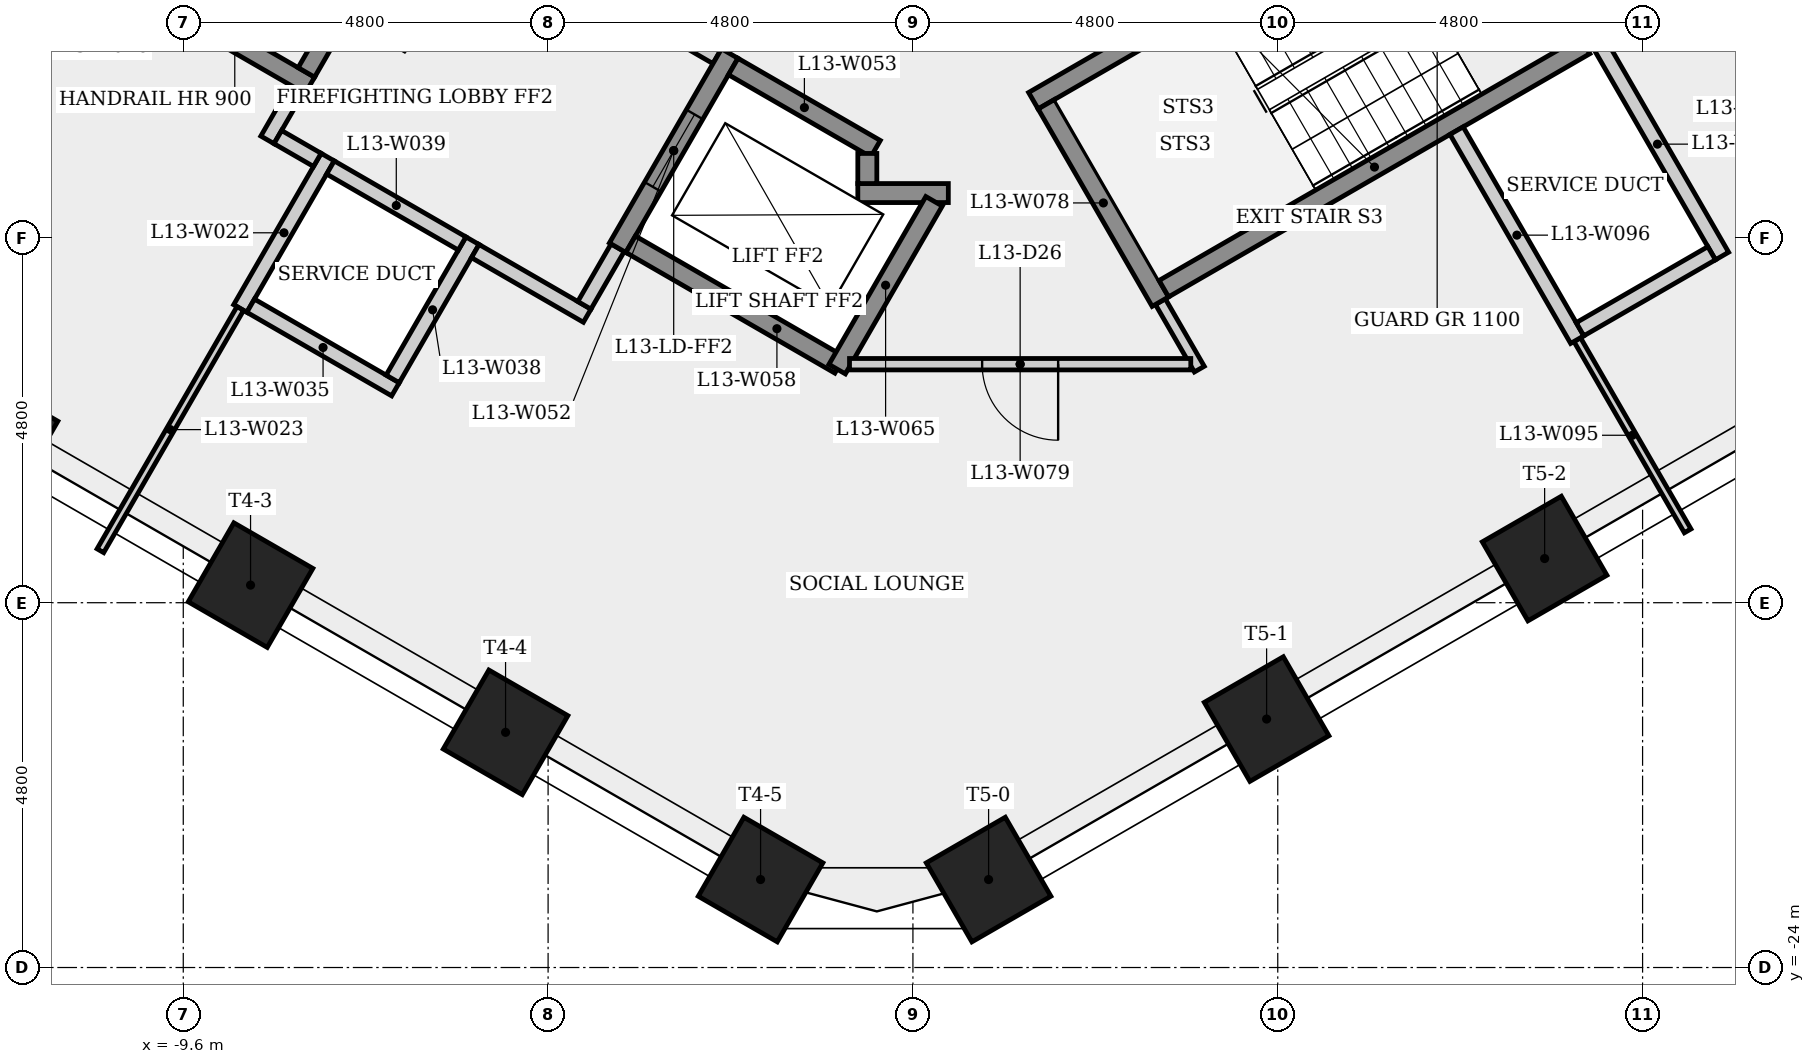
"""IFC4 building model, lengths in metres.
Left out: names, types, materials, properties, quantities, classifications, styles, units other than length and angle.
Written with IfcOpenShell. Run it as: python <this file> out.ifc"""

import sys

from ifc_helpers import new_model, si_unit, direction, frame, frame_2d, origin, origin_2d, place, context, subcontext, project, spatial, rectangle, extrude, element, fill, save


model = new_model("IFC4")
c1 = context("Model", 3, precision=1e-05, world=origin(), true_north=direction((0.0, 1.0)))
c2 = subcontext(c1, "Body", "Model", "MODEL_VIEW")
j1 = project(units=[si_unit("LENGTHUNIT", "METRE"), si_unit("PLANEANGLEUNIT", "RADIAN")], contexts=[c1])
p1 = place(None, origin())
s1 = spatial("IfcSite", under=j1, at=p1, CompositionType="ELEMENT")
p2 = place(p1, origin())
s2 = spatial("IfcBuilding", under=s1, at=p2, CompositionType="ELEMENT")
p3 = place(p2, frame((0.0, 0.0, 52.7)))
s3 = spatial("IfcBuildingStorey", under=s2, at=p3, CompositionType="ELEMENT", Elevation=52.7)
for number, where, z_axis, x_axis in (
    (1, (-12.07, -17.031, 0.0), (0.0, 0.0, 1.0), (-0.5, -0.866, 0.0)),
    (2, (-8.715, -18.969, 0.0), (0.0, 0.0, 1.0), (-0.5, -0.866, 0.0)),
    (3, (-5.36, -20.906, 0.0), (0.0, 0.0, 1.0), (-0.5, -0.866, 0.0)),
    (4, (-2.004, -22.843, 0.0), (0.0, 0.0, 1.0), (-0.5, -0.866, 0.0)),
    (5, (0.996, -22.843, 0.0), (0.0, 0.0, 1.0), (0.5, -0.866, 0.0)),
    (6, (4.653, -20.731, 0.0), (0.0, 0.0, 1.0), (0.5, -0.866, 0.0)),
    (7, (8.311, -18.619, 0.0), (0.0, 0.0, 1.0), (0.5, -0.866, 0.0)),
):
    element("IfcColumn", number, at=place(p3, frame(where, z_axis=z_axis, x_axis=x_axis)), inside=s3, PredefinedType="COLUMN", context=c2, shape_type="SweptSolid", body=[
        extrude(rectangle(XDim=1.2, YDim=1.2, at=origin_2d()), origin(), (0.0, 0.0, 1.0), 3.4),
    ])
p4 = place(p3, frame((-8.85, -15.329, 0.0), z_axis=(0.0, 0.0, 1.0), x_axis=(0.500077740698, 0.865980515519, 0.0)))
e8 = element("IfcWall", 8, at=p4, inside=s3, PredefinedType="PLUMBINGWALL", context=c2, shape_type="SweptSolid", body=[
    extrude(rectangle(XDim=2.3, YDim=0.2, at=frame_2d((1.15, 0.0))), origin(), (0.0, 0.0, 1.0), 3.05),
])
p5 = place(p3, frame((-8.85, -15.329, 0.0), z_axis=(0.0, 0.0, 1.0), x_axis=(-0.499955964762, -0.866050826049, 0.0)))
e9 = element("IfcWall", 9, at=p5, inside=s3, PredefinedType="PARTITIONING", context=c2, shape_type="SweptSolid", body=[
    extrude(rectangle(XDim=3.68, YDim=0.1, at=frame_2d((1.84, 0.0))), origin(), (0.0, 0.0, 1.0), 3.05),
])
p6 = place(p3, frame((-8.493, -13.11, 0.0), z_axis=(0.0, 0.0, 1.0), x_axis=(0.500067724834, 0.865986299303, 0.0)))
e10 = element("IfcWall", 10, at=p6, inside=s3, PredefinedType="PARTITIONING", context=c2, shape_type="SweptSolid", body=[
    extrude(rectangle(XDim=0.775, YDim=0.2, at=frame_2d((0.388, 0.0))), origin(), (0.0, 0.0, 1.0), 3.05),
])
p7 = place(p3, frame((-7.935, -12.393, 0.0), z_axis=(0.0, 0.0, 1.0), x_axis=(-0.866025499775, 0.499999833739, 0.0)))
e11 = element("IfcWall", 11, at=p7, inside=s3, PredefinedType="SHEAR", context=c2, shape_type="SweptSolid", body=[
    extrude(rectangle(XDim=6.4, YDim=0.25, at=frame_2d((3.2, 0.0))), origin(), (0.0, 0.0, 1.0), 3.05),
])
p8 = place(p3, frame((-7.836, -13.373, 0.0), z_axis=(0.0, 0.0, 1.0), x_axis=(-0.866232998003, 0.499640263761, 0.0)))
e12 = element("IfcWall", 12, at=p8, inside=s3, PredefinedType="PARTITIONING", context=c2, shape_type="SweptSolid", body=[
    extrude(rectangle(XDim=0.6, YDim=0.2, at=frame_2d((0.3, 0.0))), origin(), (0.0, 0.0, 1.0), 3.05),
])
p9 = place(p3, frame((-6.808, -16.392, 0.0), z_axis=(0.0, 0.0, 1.0), x_axis=(-0.866008176907, 0.50002983664, 0.0)))
e13 = element("IfcWall", 13, at=p9, inside=s3, PredefinedType="PLUMBINGWALL", context=c2, shape_type="SweptSolid", body=[
    extrude(rectangle(XDim=2.2, YDim=0.2, at=frame_2d((1.1, 0.0))), origin(), (0.0, 0.0, 1.0), 3.05),
])
p10 = place(p3, frame((-6.605, -9.841, 0.0), z_axis=(0.0, 0.0, 1.0), x_axis=(-0.499996545922, -0.866027397988, 0.0)))
e14 = element("IfcWall", 14, at=p10, inside=s3, PredefinedType="SHEAR", context=c2, shape_type="SweptSolid", body=[
    extrude(rectangle(XDim=2.75, YDim=0.25, at=frame_2d((1.375, 0.0))), origin(), (0.0, 0.0, 1.0), 3.05),
])
p11 = place(p10, frame((0.875, 0.0, 0.0)))
e15 = element("IfcOpeningElement", 15, at=p11, cuts=e14, PredefinedType="OPENING", context=c2, shape_type="SweptSolid", body=[
    extrude(rectangle(XDim=1.0, YDim=2.1, at=frame_2d((0.5, 1.05))), frame((0.0, 0.135, 0.0), z_axis=(0.0, -1.0, 0.0), x_axis=(1.0, 0.0, 0.0)), (0.0, 0.0, 1.0), 0.27),
])
p12 = place(p3, frame((-6.435, -9.795, 0.0), z_axis=(0.0, 0.0, 1.0), x_axis=(0.866012907634, -0.500021643343, 0.0)))
e16 = element("IfcWall", 16, at=p12, inside=s3, PredefinedType="PARTITIONING", context=c2, shape_type="SweptSolid", body=[
    extrude(rectangle(XDim=4.45, YDim=0.2, at=frame_2d((2.225, 0.0))), origin(), (0.0, 0.0, 1.0), 3.05),
])
p13 = place(p12, frame((1.675, 0.0, 0.0)))
e17 = element("IfcOpeningElement", 17, at=p13, cuts=e16, PredefinedType="OPENING", context=c2, shape_type="SweptSolid", body=[
    extrude(rectangle(XDim=1.1, YDim=2.1, at=frame_2d((0.55, 1.05))), frame((0.0, 0.11, 0.0), z_axis=(0.0, -1.0, 0.0), x_axis=(1.0, 0.0, 0.0)), (0.0, 0.0, 1.0), 0.22),
])
p14 = place(p3, frame((-5.795, -14.437, 0.0), z_axis=(0.0, 0.0, 1.0), x_axis=(-0.500027713859, -0.866009402589, 0.0)))
e18 = element("IfcWall", 18, at=p14, inside=s3, PredefinedType="PLUMBINGWALL", context=c2, shape_type="SweptSolid", body=[
    extrude(rectangle(XDim=2.1, YDim=0.2, at=frame_2d((1.05, 0.0))), origin(), (0.0, 0.0, 1.0), 3.05),
])
p15 = place(p3, frame((-5.931, -14.473, 0.0), z_axis=(0.0, 0.0, 1.0), x_axis=(-0.866041268327, 0.499972520799, 0.0)))
e19 = element("IfcWall", 19, at=p15, inside=s3, PredefinedType="PLUMBINGWALL", context=c2, shape_type="SweptSolid", body=[
    extrude(rectangle(XDim=2.0, YDim=0.2, at=frame_2d((1.0, 0.0))), origin(), (0.0, 0.0, 1.0), 3.05),
])
p16 = place(p3, frame((-4.286, -15.423, 0.0), z_axis=(0.0, 0.0, 1.0), x_axis=(-0.866025371046, 0.500000056704, 0.0)))
e20 = element("IfcWall", 20, at=p16, inside=s3, PredefinedType="PARTITIONING", context=c2, shape_type="SweptSolid", body=[
    extrude(rectangle(XDim=1.7, YDim=0.2, at=frame_2d((0.85, 0.0))), origin(), (0.0, 0.0, 1.0), 3.05),
])
p17 = place(p3, frame((-3.885, -14.529, 0.0), z_axis=(0.0, 0.0, 1.0), x_axis=(-0.499859285417, -0.866106630146, 0.0)))
e21 = element("IfcWall", 21, at=p17, inside=s3, PredefinedType="PARTITIONING", context=c2, shape_type="SweptSolid", body=[
    extrude(rectangle(XDim=0.875, YDim=0.2, at=frame_2d((0.438, 0.0))), origin(), (0.0, 0.0, 1.0), 3.05),
])
p18 = place(p3, frame((-2.41, -11.974, 0.0), z_axis=(0.0, 0.0, 1.0), x_axis=(-0.500001826776, -0.866024349092, 0.0)))
e22 = element("IfcWall", 22, at=p18, inside=s3, PredefinedType="SHEAR", context=c2, shape_type="SweptSolid", body=[
    extrude(rectangle(XDim=2.95, YDim=0.25, at=frame_2d((1.475, 0.0))), origin(), (0.0, 0.0, 1.0), 3.05),
])
p19 = place(p18, frame((0.925, 0.0, 0.0)))
e23 = element("IfcOpeningElement", 23, at=p19, cuts=e22, PredefinedType="OPENING", context=c2, shape_type="SweptSolid", body=[
    extrude(rectangle(XDim=1.1, YDim=2.1, at=frame_2d((0.55, 1.05))), frame((0.0, 0.135, 0.0), z_axis=(0.0, -1.0, 0.0), x_axis=(1.0, 0.0, 0.0)), (0.0, 0.0, 1.0), 0.27),
])
p20 = place(p3, frame((-2.364, -12.145, 0.0), z_axis=(0.0, 0.0, 1.0), x_axis=(0.86603892542, -0.499976579108, 0.0)))
e24 = element("IfcWall", 24, at=p20, inside=s3, PredefinedType="SHEAR", context=c2, shape_type="SweptSolid", body=[
    extrude(rectangle(XDim=2.162, YDim=0.25, at=frame_2d((1.081, 0.0))), origin(), (0.0, 0.0, 1.0), 3.05),
])
p21 = place(p3, frame((-0.965, -16.071, 0.0), z_axis=(0.0, 0.0, 1.0), x_axis=(-0.866029357279, 0.499993152284, 0.0)))
e25 = element("IfcWall", 25, at=p21, inside=s3, PredefinedType="SHEAR", context=c2, shape_type="SweptSolid", body=[
    extrude(rectangle(XDim=3.175, YDim=0.25, at=frame_2d((1.587, 0.0))), origin(), (0.0, 0.0, 1.0), 3.4),
])
p22 = place(p3, frame((-0.725, -13.81, 0.0), z_axis=(0.0, 0.0, 1.0), x_axis=(1.0, 0.0, 0.0)))
e26 = element("IfcWall", 26, at=p22, inside=s3, PredefinedType="SHEAR", context=c2, shape_type="SweptSolid", body=[
    extrude(rectangle(XDim=1.191, YDim=0.25, at=frame_2d((0.595, 0.0))), origin(), (0.0, 0.0, 1.0), 3.05),
])
p23 = place(p3, frame((-0.6, -13.289, 0.0), z_axis=(0.0, 0.0, 1.0), x_axis=(0.0, -1.0, 0.0)))
e27 = element("IfcWall", 27, at=p23, inside=s3, PredefinedType="SHEAR", context=c2, shape_type="SweptSolid", body=[
    extrude(rectangle(XDim=0.396, YDim=0.25, at=frame_2d((0.198, 0.0))), origin(), (0.0, 0.0, 1.0), 3.4),
])
p24 = place(p3, frame((0.278, -13.918, 0.0), z_axis=(0.0, 0.0, 1.0), x_axis=(-0.500020783669, -0.866013403995, 0.0)))
e28 = element("IfcWall", 28, at=p24, inside=s3, PredefinedType="SHEAR", context=c2, shape_type="SweptSolid", body=[
    extrude(rectangle(XDim=2.55, YDim=0.25, at=frame_2d((1.275, 0.0))), origin(), (0.0, 0.0, 1.0), 3.05),
])
p25 = place(p3, frame((1.585, -12.595, 0.0), z_axis=(0.0, 0.0, 1.0), x_axis=(0.866036417653, 0.499980922934, 0.0)))
e29 = element("IfcWall", 29, at=p25, inside=s3, PredefinedType="SHEAR", context=c2, shape_type="SweptSolid", body=[
    extrude(rectangle(XDim=6.65, YDim=0.25, at=frame_2d((3.325, 0.0))), origin(), (0.0, 0.0, 1.0), 3.05),
])
p26 = place(p25, frame((5.275, 0.0, 0.0)))
e30 = element("IfcOpeningElement", 30, at=p26, cuts=e29, PredefinedType="OPENING", context=c2, shape_type="SweptSolid", body=[
    extrude(rectangle(XDim=1.0, YDim=2.1, at=frame_2d((0.5, 1.05))), frame((0.0, 0.135, 0.0), z_axis=(0.0, -1.0, 0.0), x_axis=(1.0, 0.0, 0.0)), (0.0, 0.0, 1.0), 0.27),
])
p27 = place(p3, frame((3.256, -15.239, 0.0), z_axis=(0.0, 0.0, 1.0), x_axis=(0.50003162148, -0.866007146345, 0.0)))
e31 = element("IfcWall", 31, at=p27, inside=s3, PredefinedType="PARTITIONING", context=c2, shape_type="SweptSolid", body=[
    extrude(rectangle(XDim=1.025, YDim=0.15, at=frame_2d((0.513, 0.0))), origin(), (0.0, 0.0, 1.0), 3.05),
])
p28 = place(p3, frame((3.256, -15.239, 0.0), z_axis=(0.0, 0.0, 1.0), x_axis=(-0.50002537861, 0.866010750942, 0.0)))
e32 = element("IfcWall", 32, at=p28, inside=s3, PredefinedType="SHEAR", context=c2, shape_type="SweptSolid", body=[
    extrude(rectangle(XDim=3.0, YDim=0.25, at=frame_2d((1.5, 0.0))), origin(), (0.0, 0.0, 1.0), 3.05),
])
p29 = place(p3, frame((3.656, -16.062, 0.0), z_axis=(0.0, 0.0, 1.0), x_axis=(-1.0, 0.0, 0.0)))
e33 = element("IfcWall", 33, at=p29, inside=s3, PredefinedType="PARTITIONING", context=c2, shape_type="SweptSolid", body=[
    extrude(rectangle(XDim=4.49, YDim=0.15, at=frame_2d((2.245, 0.0))), origin(), (0.0, 0.0, 1.0), 3.05),
])
p30 = place(p29, frame((1.745, 0.0, 0.0)))
e34 = element("IfcOpeningElement", 34, at=p30, cuts=e33, PredefinedType="OPENING", context=c2, shape_type="SweptSolid", body=[
    extrude(rectangle(XDim=1.0, YDim=2.1, at=frame_2d((0.5, 1.05))), frame((0.0, 0.085, 0.0), z_axis=(0.0, -1.0, 0.0), x_axis=(1.0, 0.0, 0.0)), (0.0, 0.0, 1.0), 0.17),
])
p31 = place(p3, frame((3.301, -15.068, 0.0), z_axis=(0.0, 0.0, 1.0), x_axis=(0.866035036182, 0.499983315828, 0.0)))
e35 = element("IfcWall", 35, at=p31, inside=s3, PredefinedType="SHEAR", context=c2, shape_type="SweptSolid", body=[
    extrude(rectangle(XDim=6.4, YDim=0.25, at=frame_2d((3.2, 0.0))), origin(), (0.0, 0.0, 1.0), 3.05),
])
p32 = place(p3, frame((8.74, -15.738, 0.0), z_axis=(0.0, 0.0, 1.0), x_axis=(0.500042431503, -0.866000904559, 0.0)))
e36 = element("IfcWall", 36, at=p32, inside=s3, PredefinedType="PARTITIONING", context=c2, shape_type="SweptSolid", body=[
    extrude(rectangle(XDim=2.906, YDim=0.1, at=frame_2d((1.453, 0.0))), origin(), (0.0, 0.0, 1.0), 3.05),
])
p33 = place(p3, frame((8.74, -15.739, 0.0), z_axis=(0.0, 0.0, 1.0), x_axis=(-0.500017526161, 0.866015284814, 0.0)))
e37 = element("IfcWall", 37, at=p33, inside=s3, PredefinedType="PLUMBINGWALL", context=c2, shape_type="SweptSolid", body=[
    extrude(rectangle(XDim=3.175, YDim=0.2, at=frame_2d((1.588, 0.0))), origin(), (0.0, 0.0, 1.0), 3.05),
])
p34 = place(p3, frame((8.945, -11.694, 0.0), z_axis=(0.0, 0.0, 1.0), x_axis=(0.500062241894, -0.865989465428, 0.0)))
e38 = element("IfcWall", 38, at=p34, inside=s3, PredefinedType="PLUMBINGWALL", context=c2, shape_type="SweptSolid", body=[
    extrude(rectangle(XDim=3.4, YDim=0.2, at=frame_2d((1.7, 0.0))), origin(), (0.0, 0.0, 1.0), 3.05),
])
p35 = place(p3, frame((10.509, -14.602, 0.0), z_axis=(0.0, 0.0, 1.0), x_axis=(-0.866010750942, -0.50002537861, 0.0)))
e39 = element("IfcWall", 39, at=p35, inside=s3, PredefinedType="PLUMBINGWALL", context=c2, shape_type="SweptSolid", body=[
    extrude(rectangle(XDim=2.0, YDim=0.2, at=frame_2d((1.0, 0.0))), origin(), (0.0, 0.0, 1.0), 3.05),
])
p36 = place(p19, origin())
e40 = element("IfcDoor", 40, at=p36, inside=s3, OperationType="SLIDING_TO_LEFT", PredefinedType="DOOR", context=c2, shape_type="SweptSolid", body=[
    extrude(rectangle(XDim=1.1, YDim=2.1, at=frame_2d((0.55, 1.05))), frame((0.0, 0.025, 0.0), z_axis=(0.0, -1.0, 0.0), x_axis=(1.0, 0.0, 0.0)), (0.0, 0.0, 1.0), 0.05),
])
fill(e23, e40)
p37 = place(p30, origin())
e41 = element("IfcDoor", 41, at=p37, inside=s3, OperationType="SINGLE_SWING_LEFT", PredefinedType="DOOR", context=c2, shape_type="SweptSolid", body=[
    extrude(rectangle(XDim=1.0, YDim=2.1, at=frame_2d((0.5, 1.05))), frame((0.0, 0.025, 0.0), z_axis=(0.0, -1.0, 0.0), x_axis=(1.0, 0.0, 0.0)), (0.0, 0.0, 1.0), 0.05),
])
fill(e34, e41)
save(model, sys.argv[1])
